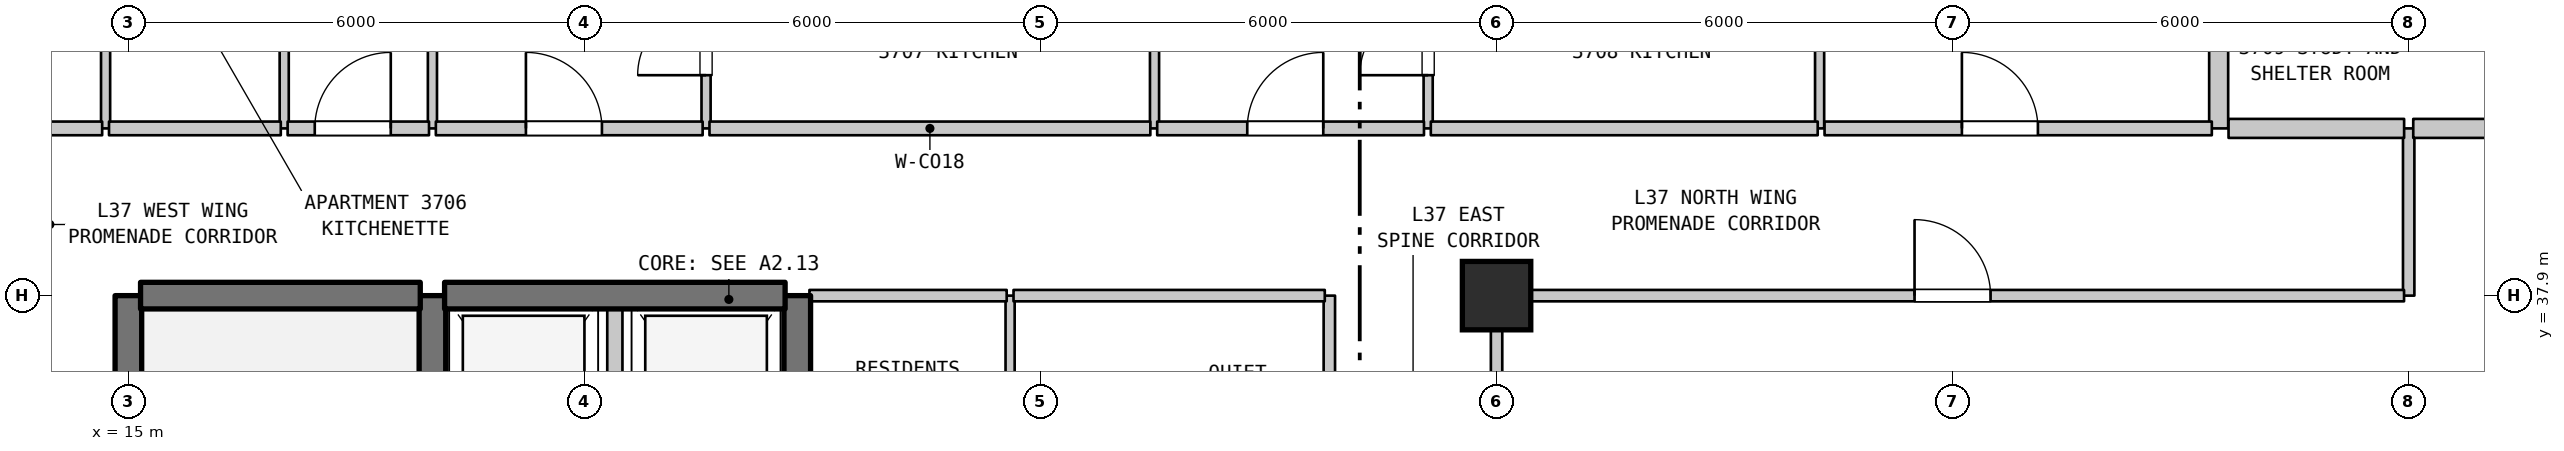
"""IFC4 building model, lengths in metres.
Left out: names, types, materials, properties, quantities, classifications, styles, units other than length and angle.
Written with IfcOpenShell. Run it as: python <this file> out.ifc"""

import sys

from ifc_helpers import new_model, si_unit, direction, frame, frame_2d, origin, origin_2d, place, context, subcontext, project, spatial, rectangle, extrude, element, fill, save


model = new_model("IFC4")
c1 = context("Model", 3, precision=1e-05, world=origin(), true_north=direction((0.0, 1.0)))
c2 = subcontext(c1, "Body", "Model", "MODEL_VIEW")
j1 = project(units=[si_unit("LENGTHUNIT", "METRE"), si_unit("PLANEANGLEUNIT", "RADIAN")], contexts=[c1])
p1 = place(None, origin())
s1 = spatial("IfcSite", under=j1, at=p1, CompositionType="ELEMENT")
p2 = place(p1, origin())
s2 = spatial("IfcBuilding", under=s1, at=p2, CompositionType="ELEMENT")
p3 = place(p2, frame((0.0, 0.0, 152.0)))
s3 = spatial("IfcBuildingStorey", under=s2, at=p3, CompositionType="ELEMENT", Elevation=152.0)
p4 = place(p3, frame((33.0, 37.9, 0.0), z_axis=(0.0, 0.0, 1.0), x_axis=(1.0, 0.0, 0.0)))
e1 = element("IfcColumn", 1, at=p4, inside=s3, PredefinedType="COLUMN", context=c2, shape_type="SweptSolid", body=[
    extrude(rectangle(XDim=0.9, YDim=0.9, at=origin_2d()), origin(), (0.0, 0.0, 1.0), 3.7),
])
p5 = place(p3, frame((14.7, 40.1, 0.0), z_axis=(0.0, 0.0, 1.0), x_axis=(0.0, 1.0, 0.0)))
e2 = element("IfcWall", 2, at=p5, inside=s3, PredefinedType="PARTITIONING", context=c2, shape_type="SweptSolid", body=[
    extrude(rectangle(XDim=3.2, YDim=0.12, at=frame_2d((1.6, 0.0))), origin(), (0.0, 0.0, 1.0), 3.385),
])
p6 = place(p5, frame((1.15, 0.0, 0.0)))
e3 = element("IfcOpeningElement", 3, at=p6, cuts=e2, PredefinedType="OPENING", context=c2, shape_type="SweptSolid", body=[
    extrude(rectangle(XDim=0.9, YDim=2.15, at=frame_2d((0.45, 1.075))), frame((0.0, 0.07, 0.0), z_axis=(0.0, -1.0, 0.0), x_axis=(1.0, 0.0, 0.0)), (0.0, 0.0, 1.0), 0.14),
])
p7 = place(p3, frame((15.0, 31.1, 0.0), z_axis=(0.0, 0.0, 1.0), x_axis=(0.0, 1.0, 0.0)))
e4 = element("IfcWall", 4, at=p7, inside=s3, PredefinedType="SHEAR", context=c2, shape_type="SweptSolid", body=[
    extrude(rectangle(XDim=6.8, YDim=0.35, at=frame_2d((3.4, 0.0))), origin(), (0.0, 0.0, 1.0), 3.385),
])
p8 = place(p3, frame((17.05, 40.1, 0.0), z_axis=(0.0, 0.0, 1.0), x_axis=(0.0, 1.0, 0.0)))
e5 = element("IfcWall", 5, at=p8, inside=s3, PredefinedType="PARTITIONING", context=c2, shape_type="SweptSolid", body=[
    extrude(rectangle(XDim=3.2, YDim=0.12, at=frame_2d((1.6, 0.0))), origin(), (0.0, 0.0, 1.0), 3.385),
])
p9 = place(p3, frame((19.0, 35.0, 0.0), z_axis=(0.0, 0.0, 1.0), x_axis=(0.0, 1.0, 0.0)))
e6 = element("IfcWall", 6, at=p9, inside=s3, PredefinedType="SHEAR", context=c2, shape_type="SweptSolid", body=[
    extrude(rectangle(XDim=2.9, YDim=0.35, at=frame_2d((1.45, 0.0))), origin(), (0.0, 0.0, 1.0), 3.385),
])
p10 = place(p3, frame((19.0, 40.1, 0.0), z_axis=(0.0, 0.0, 1.0), x_axis=(0.0, 1.0, 0.0)))
e7 = element("IfcWall", 7, at=p10, inside=s3, PredefinedType="PARTITIONING", context=c2, shape_type="SweptSolid", body=[
    extrude(rectangle(XDim=13.79, YDim=0.12, at=frame_2d((6.895, 0.0))), origin(), (0.0, 0.0, 1.0), 3.385),
])
p11 = place(p3, frame((21.4, 35.0, 0.0), z_axis=(0.0, 0.0, 1.0), x_axis=(0.0, 1.0, 0.0)))
e8 = element("IfcWall", 8, at=p11, inside=s3, PredefinedType="STANDARD", context=c2, shape_type="SweptSolid", body=[
    extrude(rectangle(XDim=2.9, YDim=0.2, at=frame_2d((1.45, 0.0))), origin(), (0.0, 0.0, 1.0), 3.385),
])
p12 = place(p3, frame((22.6, 40.1, 0.0), z_axis=(0.0, 0.0, 1.0), x_axis=(0.0, 1.0, 0.0)))
e9 = element("IfcWall", 9, at=p12, inside=s3, PredefinedType="PARTITIONING", context=c2, shape_type="SweptSolid", body=[
    extrude(rectangle(XDim=2.3, YDim=0.12, at=frame_2d((1.15, 0.0))), origin(), (0.0, 0.0, 1.0), 3.385),
])
p13 = place(p12, frame((0.7, 0.0, 0.0)))
e10 = element("IfcOpeningElement", 10, at=p13, cuts=e9, PredefinedType="OPENING", context=c2, shape_type="SweptSolid", body=[
    extrude(rectangle(XDim=0.9, YDim=2.15, at=frame_2d((0.45, 1.075))), frame((0.0, 0.07, 0.0), z_axis=(0.0, -1.0, 0.0), x_axis=(1.0, 0.0, 0.0)), (0.0, 0.0, 1.0), 0.14),
])
p14 = place(p3, frame((23.8, 35.0, 0.0), z_axis=(0.0, 0.0, 1.0), x_axis=(0.0, 1.0, 0.0)))
e11 = element("IfcWall", 11, at=p14, inside=s3, PredefinedType="SHEAR", context=c2, shape_type="SweptSolid", body=[
    extrude(rectangle(XDim=2.9, YDim=0.35, at=frame_2d((1.45, 0.0))), origin(), (0.0, 0.0, 1.0), 3.385),
])
p15 = place(p3, frame((26.6, 35.0, 0.0), z_axis=(0.0, 0.0, 1.0), x_axis=(0.0, 1.0, 0.0)))
e12 = element("IfcWall", 12, at=p15, inside=s3, PredefinedType="PARTITIONING", context=c2, shape_type="SweptSolid", body=[
    extrude(rectangle(XDim=2.9, YDim=0.12, at=frame_2d((1.45, 0.0))), origin(), (0.0, 0.0, 1.0), 3.385),
])
p16 = place(p3, frame((28.5, 40.1, 0.0), z_axis=(0.0, 0.0, 1.0), x_axis=(0.0, 1.0, 0.0)))
e13 = element("IfcWall", 13, at=p16, inside=s3, PredefinedType="PARTITIONING", context=c2, shape_type="SweptSolid", body=[
    extrude(rectangle(XDim=2.3, YDim=0.12, at=frame_2d((1.15, 0.0))), origin(), (0.0, 0.0, 1.0), 3.385),
])
p17 = place(p3, frame((30.8, 35.0, 0.0), z_axis=(0.0, 0.0, 1.0), x_axis=(0.0, 1.0, 0.0)))
e14 = element("IfcWall", 14, at=p17, inside=s3, PredefinedType="STANDARD", context=c2, shape_type="SweptSolid", body=[
    extrude(rectangle(XDim=2.9, YDim=0.15, at=frame_2d((1.45, 0.0))), origin(), (0.0, 0.0, 1.0), 3.385),
])
p18 = place(p3, frame((32.1, 40.1, 0.0), z_axis=(0.0, 0.0, 1.0), x_axis=(0.0, 1.0, 0.0)))
e15 = element("IfcWall", 15, at=p18, inside=s3, PredefinedType="PARTITIONING", context=c2, shape_type="SweptSolid", body=[
    extrude(rectangle(XDim=2.3, YDim=0.12, at=frame_2d((1.15, 0.0))), origin(), (0.0, 0.0, 1.0), 3.385),
])
p19 = place(p18, frame((0.7, 0.0, 0.0)))
e16 = element("IfcOpeningElement", 16, at=p19, cuts=e15, PredefinedType="OPENING", context=c2, shape_type="SweptSolid", body=[
    extrude(rectangle(XDim=0.9, YDim=2.15, at=frame_2d((0.45, 1.075))), frame((0.0, 0.07, 0.0), z_axis=(0.0, -1.0, 0.0), x_axis=(1.0, 0.0, 0.0)), (0.0, 0.0, 1.0), 0.14),
])
p20 = place(p3, frame((33.0, 33.88, 0.0), z_axis=(0.0, 0.0, 1.0), x_axis=(0.0, 1.0, 0.0)))
e17 = element("IfcWall", 17, at=p20, inside=s3, PredefinedType="STANDARD", context=c2, shape_type="SweptSolid", body=[
    extrude(rectangle(XDim=4.02, YDim=0.15, at=frame_2d((2.01, 0.0))), origin(), (0.0, 0.0, 1.0), 2.885),
])
p21 = place(p20, frame((1.436, 0.0, 0.0)))
e18 = element("IfcOpeningElement", 18, at=p21, cuts=e17, PredefinedType="OPENING", context=c2, shape_type="SweptSolid", body=[
    extrude(rectangle(XDim=1.0, YDim=2.15, at=frame_2d((0.5, 1.075))), frame((0.0, 0.085, 0.0), z_axis=(0.0, -1.0, 0.0), x_axis=(1.0, 0.0, 0.0)), (0.0, 0.0, 1.0), 0.17),
])
p22 = place(p3, frame((37.25, 40.1, 0.0), z_axis=(0.0, 0.0, 1.0), x_axis=(0.0, 1.0, 0.0)))
e19 = element("IfcWall", 19, at=p22, inside=s3, PredefinedType="PARTITIONING", context=c2, shape_type="SweptSolid", body=[
    extrude(rectangle(XDim=2.05, YDim=0.12, at=frame_2d((1.025, 0.0))), origin(), (0.0, 0.0, 1.0), 3.385),
])
p23 = place(p3, frame((42.5, 40.1, 0.0), z_axis=(0.0, 0.0, 1.0), x_axis=(0.0, 1.0, 0.0)))
e20 = element("IfcWall", 20, at=p23, inside=s3, PredefinedType="STANDARD", context=c2, shape_type="SweptSolid", body=[
    extrude(rectangle(XDim=2.3, YDim=0.25, at=frame_2d((1.15, 0.0))), origin(), (0.0, 0.0, 1.0), 3.385),
])
p24 = place(p3, frame((45.0, 37.9, 0.0), z_axis=(0.0, 0.0, 1.0), x_axis=(0.0, 1.0, 0.0)))
e21 = element("IfcWall", 21, at=p24, inside=s3, PredefinedType="STANDARD", context=c2, shape_type="SweptSolid", body=[
    extrude(rectangle(XDim=2.2, YDim=0.15, at=frame_2d((1.1, 0.0))), origin(), (0.0, 0.0, 1.0), 3.385),
])
p25 = place(p3, frame((15.16, 37.9, 0.0), z_axis=(0.0, 0.0, 1.0), x_axis=(1.0, 0.0, 0.0)))
e22 = element("IfcWall", 22, at=p25, inside=s3, PredefinedType="SHEAR", context=c2, shape_type="SweptSolid", body=[
    extrude(rectangle(XDim=3.68, YDim=0.35, at=frame_2d((1.84, 0.0))), origin(), (0.0, 0.0, 1.0), 3.385),
])
p26 = place(p3, frame((19.16, 37.9, 0.0), z_axis=(0.0, 0.0, 1.0), x_axis=(1.0, 0.0, 0.0)))
e23 = element("IfcWall", 23, at=p26, inside=s3, PredefinedType="SHEAR", context=c2, shape_type="SweptSolid", body=[
    extrude(rectangle(XDim=4.48, YDim=0.35, at=frame_2d((2.24, 0.0))), origin(), (0.0, 0.0, 1.0), 3.385),
])
p27 = place(p3, frame((23.96, 37.9, 0.0), z_axis=(0.0, 0.0, 1.0), x_axis=(1.0, 0.0, 0.0)))
e24 = element("IfcWall", 24, at=p27, inside=s3, PredefinedType="STANDARD", context=c2, shape_type="SweptSolid", body=[
    extrude(rectangle(XDim=2.595, YDim=0.15, at=frame_2d((1.297, 0.0))), origin(), (0.0, 0.0, 1.0), 2.885),
])
p28 = place(p3, frame((26.645, 37.9, 0.0), z_axis=(0.0, 0.0, 1.0), x_axis=(1.0, 0.0, 0.0)))
e25 = element("IfcWall", 25, at=p28, inside=s3, PredefinedType="STANDARD", context=c2, shape_type="SweptSolid", body=[
    extrude(rectangle(XDim=4.095, YDim=0.15, at=frame_2d((2.047, 0.0))), origin(), (0.0, 0.0, 1.0), 2.885),
])
p29 = place(p3, frame((33.06, 37.9, 0.0), z_axis=(0.0, 0.0, 1.0), x_axis=(1.0, 0.0, 0.0)))
e26 = element("IfcWall", 26, at=p29, inside=s3, PredefinedType="STANDARD", context=c2, shape_type="SweptSolid", body=[
    extrude(rectangle(XDim=11.879, YDim=0.15, at=frame_2d((5.939, 0.0))), origin(), (0.0, 0.0, 1.0), 3.385),
])
p30 = place(p29, frame((5.439, 0.0, 0.0)))
e27 = element("IfcOpeningElement", 27, at=p30, cuts=e26, PredefinedType="OPENING", context=c2, shape_type="SweptSolid", body=[
    extrude(rectangle(XDim=1.0, YDim=2.15, at=frame_2d((0.5, 1.075))), frame((0.0, 0.085, 0.0), z_axis=(0.0, -1.0, 0.0), x_axis=(1.0, 0.0, 0.0)), (0.0, 0.0, 1.0), 0.17),
])
p31 = place(p3, frame((12.875, 40.1, 0.0), z_axis=(0.0, 0.0, 1.0), x_axis=(1.0, 0.0, 0.0)))
e28 = element("IfcWall", 28, at=p31, inside=s3, PredefinedType="STANDARD", context=c2, shape_type="SweptSolid", body=[
    extrude(rectangle(XDim=1.78, YDim=0.18, at=frame_2d((0.89, 0.0))), origin(), (0.0, 0.0, 1.0), 3.385),
])
p32 = place(p3, frame((14.745, 40.1, 0.0), z_axis=(0.0, 0.0, 1.0), x_axis=(1.0, 0.0, 0.0)))
e29 = element("IfcWall", 29, at=p32, inside=s3, PredefinedType="STANDARD", context=c2, shape_type="SweptSolid", body=[
    extrude(rectangle(XDim=2.26, YDim=0.18, at=frame_2d((1.13, 0.0))), origin(), (0.0, 0.0, 1.0), 3.385),
])
p33 = place(p3, frame((17.095, 40.1, 0.0), z_axis=(0.0, 0.0, 1.0), x_axis=(1.0, 0.0, 0.0)))
e30 = element("IfcWall", 30, at=p33, inside=s3, PredefinedType="STANDARD", context=c2, shape_type="SweptSolid", body=[
    extrude(rectangle(XDim=1.86, YDim=0.18, at=frame_2d((0.93, 0.0))), origin(), (0.0, 0.0, 1.0), 3.385),
])
p34 = place(p33, frame((0.357, 0.0, 0.0)))
e31 = element("IfcOpeningElement", 31, at=p34, cuts=e30, PredefinedType="OPENING", context=c2, shape_type="SweptSolid", body=[
    extrude(rectangle(XDim=1.0, YDim=2.15, at=frame_2d((0.5, 1.075))), frame((0.0, 0.1, 0.0), z_axis=(0.0, -1.0, 0.0), x_axis=(1.0, 0.0, 0.0)), (0.0, 0.0, 1.0), 0.2),
])
p35 = place(p3, frame((19.045, 40.1, 0.0), z_axis=(0.0, 0.0, 1.0), x_axis=(1.0, 0.0, 0.0)))
e32 = element("IfcWall", 32, at=p35, inside=s3, PredefinedType="STANDARD", context=c2, shape_type="SweptSolid", body=[
    extrude(rectangle(XDim=3.51, YDim=0.18, at=frame_2d((1.755, 0.0))), origin(), (0.0, 0.0, 1.0), 3.385),
])
p36 = place(p35, frame((1.185, 0.0, 0.0)))
e33 = element("IfcOpeningElement", 33, at=p36, cuts=e32, PredefinedType="OPENING", context=c2, shape_type="SweptSolid", body=[
    extrude(rectangle(XDim=1.0, YDim=2.15, at=frame_2d((0.5, 1.075))), frame((0.0, 0.1, 0.0), z_axis=(0.0, -1.0, 0.0), x_axis=(1.0, 0.0, 0.0)), (0.0, 0.0, 1.0), 0.2),
])
p37 = place(p3, frame((22.645, 40.1, 0.0), z_axis=(0.0, 0.0, 1.0), x_axis=(1.0, 0.0, 0.0)))
e34 = element("IfcWall", 34, at=p37, inside=s3, PredefinedType="STANDARD", context=c2, shape_type="SweptSolid", body=[
    extrude(rectangle(XDim=5.8, YDim=0.18, at=frame_2d((2.9, 0.0))), origin(), (0.0, 0.0, 1.0), 3.385),
])
p38 = place(p3, frame((28.535, 40.1, 0.0), z_axis=(0.0, 0.0, 1.0), x_axis=(1.0, 0.0, 0.0)))
e35 = element("IfcWall", 35, at=p38, inside=s3, PredefinedType="STANDARD", context=c2, shape_type="SweptSolid", body=[
    extrude(rectangle(XDim=3.51, YDim=0.18, at=frame_2d((1.755, 0.0))), origin(), (0.0, 0.0, 1.0), 3.385),
])
p39 = place(p38, frame((1.185, 0.0, 0.0)))
e36 = element("IfcOpeningElement", 36, at=p39, cuts=e35, PredefinedType="OPENING", context=c2, shape_type="SweptSolid", body=[
    extrude(rectangle(XDim=1.0, YDim=2.15, at=frame_2d((0.5, 1.075))), frame((0.0, 0.1, 0.0), z_axis=(0.0, -1.0, 0.0), x_axis=(1.0, 0.0, 0.0)), (0.0, 0.0, 1.0), 0.2),
])
p40 = place(p3, frame((32.135, 40.1, 0.0), z_axis=(0.0, 0.0, 1.0), x_axis=(1.0, 0.0, 0.0)))
e37 = element("IfcWall", 37, at=p40, inside=s3, PredefinedType="STANDARD", context=c2, shape_type="SweptSolid", body=[
    extrude(rectangle(XDim=5.09, YDim=0.18, at=frame_2d((2.545, 0.0))), origin(), (0.0, 0.0, 1.0), 3.385),
])
p41 = place(p3, frame((37.315, 40.1, 0.0), z_axis=(0.0, 0.0, 1.0), x_axis=(1.0, 0.0, 0.0)))
e38 = element("IfcWall", 38, at=p41, inside=s3, PredefinedType="STANDARD", context=c2, shape_type="SweptSolid", body=[
    extrude(rectangle(XDim=5.095, YDim=0.18, at=frame_2d((2.547, 0.0))), origin(), (0.0, 0.0, 1.0), 3.385),
])
p42 = place(p41, frame((1.807, 0.0, 0.0)))
e39 = element("IfcOpeningElement", 39, at=p42, cuts=e38, PredefinedType="OPENING", context=c2, shape_type="SweptSolid", body=[
    extrude(rectangle(XDim=1.0, YDim=2.15, at=frame_2d((0.5, 1.075))), frame((0.0, 0.1, 0.0), z_axis=(0.0, -1.0, 0.0), x_axis=(1.0, 0.0, 0.0)), (0.0, 0.0, 1.0), 0.2),
])
p43 = place(p3, frame((42.63, 40.1, 0.0), z_axis=(0.0, 0.0, 1.0), x_axis=(1.0, 0.0, 0.0)))
e40 = element("IfcWall", 40, at=p43, inside=s3, PredefinedType="STANDARD", context=c2, shape_type="SweptSolid", body=[
    extrude(rectangle(XDim=2.31, YDim=0.25, at=frame_2d((1.155, 0.0))), origin(), (0.0, 0.0, 1.0), 3.385),
])
p44 = place(p3, frame((45.06, 40.1, 0.0), z_axis=(0.0, 0.0, 1.0), x_axis=(1.0, 0.0, 0.0)))
e41 = element("IfcWall", 41, at=p44, inside=s3, PredefinedType="STANDARD", context=c2, shape_type="SweptSolid", body=[
    extrude(rectangle(XDim=2.285, YDim=0.25, at=frame_2d((1.143, 0.0))), origin(), (0.0, 0.0, 1.0), 3.385),
])
p45 = place(p13, origin())
e42 = element("IfcDoor", 42, at=p45, inside=s3, OperationType="SINGLE_SWING_LEFT", PredefinedType="DOOR", context=c2, shape_type="SweptSolid", body=[
    extrude(rectangle(XDim=0.9, YDim=2.15, at=frame_2d((0.45, 1.075))), frame((0.0, 0.025, 0.0), z_axis=(0.0, -1.0, 0.0), x_axis=(1.0, 0.0, 0.0)), (0.0, 0.0, 1.0), 0.05),
])
fill(e10, e42)
p46 = place(p19, origin())
e43 = element("IfcDoor", 43, at=p46, inside=s3, OperationType="SINGLE_SWING_LEFT", PredefinedType="DOOR", context=c2, shape_type="SweptSolid", body=[
    extrude(rectangle(XDim=0.9, YDim=2.15, at=frame_2d((0.45, 1.075))), frame((0.0, 0.025, 0.0), z_axis=(0.0, -1.0, 0.0), x_axis=(1.0, 0.0, 0.0)), (0.0, 0.0, 1.0), 0.05),
])
fill(e16, e43)
p47 = place(p30, origin())
e44 = element("IfcDoor", 44, at=p47, inside=s3, OperationType="SINGLE_SWING_LEFT", PredefinedType="DOOR", context=c2, shape_type="SweptSolid", body=[
    extrude(rectangle(XDim=1.0, YDim=2.15, at=frame_2d((0.5, 1.075))), frame((0.0, 0.025, 0.0), z_axis=(0.0, -1.0, 0.0), x_axis=(1.0, 0.0, 0.0)), (0.0, 0.0, 1.0), 0.05),
])
fill(e27, e44)
p48 = place(p34, origin())
e45 = element("IfcDoor", 45, at=p48, inside=s3, OperationType="SINGLE_SWING_RIGHT", PredefinedType="DOOR", context=c2, shape_type="SweptSolid", body=[
    extrude(rectangle(XDim=1.0, YDim=2.15, at=frame_2d((0.5, 1.075))), frame((0.0, 0.025, 0.0), z_axis=(0.0, -1.0, 0.0), x_axis=(1.0, 0.0, 0.0)), (0.0, 0.0, 1.0), 0.05),
])
fill(e31, e45)
p49 = place(p36, origin())
e46 = element("IfcDoor", 46, at=p49, inside=s3, OperationType="SINGLE_SWING_LEFT", PredefinedType="DOOR", context=c2, shape_type="SweptSolid", body=[
    extrude(rectangle(XDim=1.0, YDim=2.15, at=frame_2d((0.5, 1.075))), frame((0.0, 0.025, 0.0), z_axis=(0.0, -1.0, 0.0), x_axis=(1.0, 0.0, 0.0)), (0.0, 0.0, 1.0), 0.05),
])
fill(e33, e46)
p50 = place(p39, origin())
e47 = element("IfcDoor", 47, at=p50, inside=s3, OperationType="SINGLE_SWING_RIGHT", PredefinedType="DOOR", context=c2, shape_type="SweptSolid", body=[
    extrude(rectangle(XDim=1.0, YDim=2.15, at=frame_2d((0.5, 1.075))), frame((0.0, 0.025, 0.0), z_axis=(0.0, -1.0, 0.0), x_axis=(1.0, 0.0, 0.0)), (0.0, 0.0, 1.0), 0.05),
])
fill(e36, e47)
p51 = place(p42, origin())
e48 = element("IfcDoor", 48, at=p51, inside=s3, OperationType="SINGLE_SWING_LEFT", PredefinedType="DOOR", context=c2, shape_type="SweptSolid", body=[
    extrude(rectangle(XDim=1.0, YDim=2.15, at=frame_2d((0.5, 1.075))), frame((0.0, 0.025, 0.0), z_axis=(0.0, -1.0, 0.0), x_axis=(1.0, 0.0, 0.0)), (0.0, 0.0, 1.0), 0.05),
])
fill(e39, e48)
save(model, sys.argv[1])
